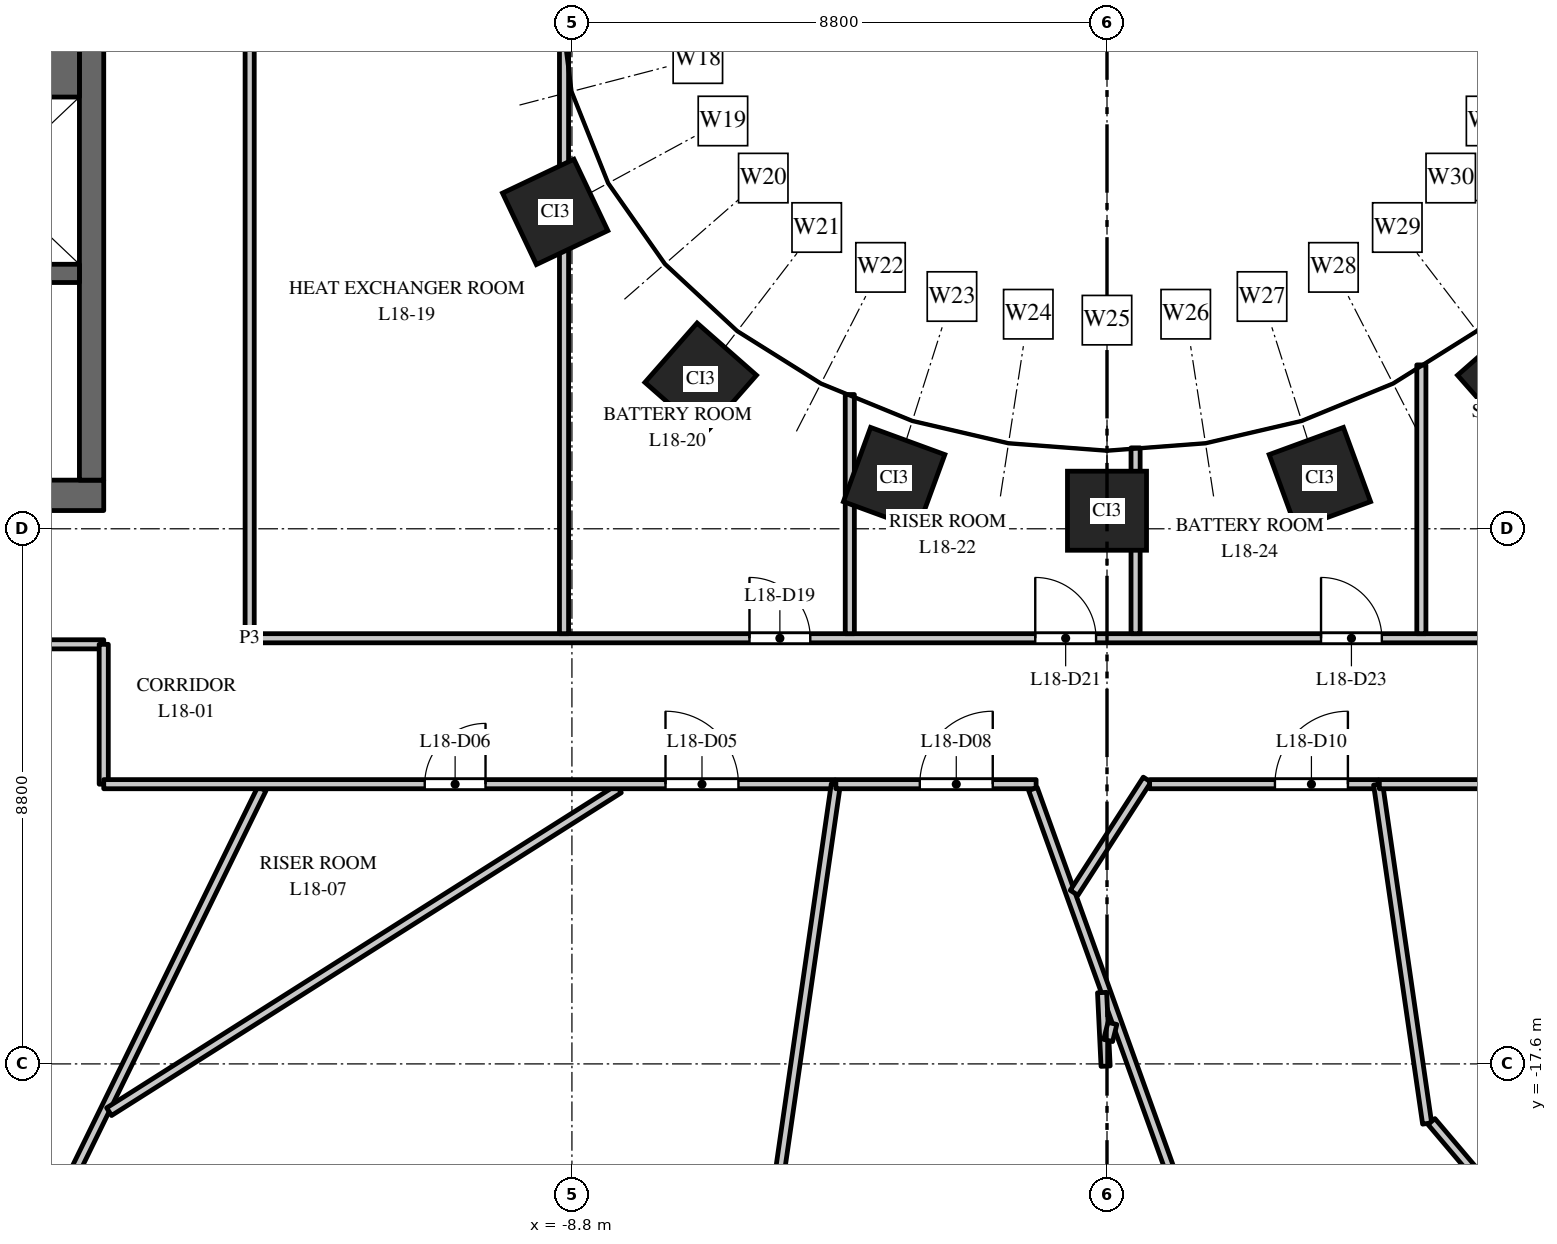
"""IFC4 building model, lengths in metres.
Left out: names, types, materials, properties, quantities, classifications, styles, units other than length and angle.
Written with IfcOpenShell. Run it as: python <this file> out.ifc"""

import sys

from ifc_helpers import new_model, si_unit, direction, frame, frame_2d, origin, origin_2d, place, context, subcontext, project, spatial, rectangle, extrude, element, fill, save


model = new_model("IFC4")
c1 = context("Model", 3, precision=1e-05, world=origin(), true_north=direction((0.0, 1.0)))
c2 = subcontext(c1, "Body", "Model", "MODEL_VIEW")
j1 = project(units=[si_unit("LENGTHUNIT", "METRE"), si_unit("PLANEANGLEUNIT", "RADIAN")], contexts=[c1])
p1 = place(None, origin())
s1 = spatial("IfcSite", under=j1, at=p1, CompositionType="ELEMENT")
p2 = place(p1, origin())
s2 = spatial("IfcBuilding", under=s1, at=p2, CompositionType="ELEMENT")
p3 = place(p2, frame((0.0, 0.0, 82.5)))
s3 = spatial("IfcBuildingStorey", under=s2, at=p3, CompositionType="ELEMENT", Elevation=82.5)
for number, where, z_axis, x_axis in (
    (1, (-9.076, -3.588, 0.0), (0.0, 0.0, 1.0), (0.429, -0.903, 0.0)),
    (2, (-6.682, -6.334, 0.0), (0.0, 0.0, 1.0), (0.751, -0.66, 0.0)),
    (3, (-3.501, -7.967, 0.0), (0.0, 0.0, 1.0), (0.939, -0.344, 0.0)),
    (4, (0.0, -8.503, 0.0), (0.0, 0.0, 1.0), (1.0, 0.0, 0.0)),
    (5, (3.501, -7.967, 0.0), (0.0, 0.0, 1.0), (0.939, 0.344, 0.0)),
    (6, (6.682, -6.334, 0.0), (0.0, 0.0, 1.0), (0.751, 0.66, 0.0)),
):
    element("IfcColumn", number, at=place(p3, frame(where, z_axis=z_axis, x_axis=x_axis)), inside=s3, PredefinedType="COLUMN", context=c2, shape_type="SweptSolid", body=[
        extrude(rectangle(XDim=1.3, YDim=1.3, at=origin_2d()), origin(), (0.0, 0.0, 1.0), 5.5),
    ])
p4 = place(p3, frame((-16.5, -8.25, 0.0), z_axis=(0.0, 0.0, 1.0), x_axis=(-1.0, 0.0, 0.0)))
e7 = element("IfcWall", 7, at=p4, inside=s3, PredefinedType="SHEAR", context=c2, shape_type="SweptSolid", body=[
    extrude(rectangle(XDim=15.0, YDim=0.5, at=frame_2d((7.5, 0.0))), origin(), (0.0, 0.0, 1.0), 5.2),
])
p5 = place(p4, frame((6.9, 0.0, 0.0)))
e8 = element("IfcOpeningElement", 8, at=p5, cuts=e7, PredefinedType="OPENING", context=c2, shape_type="SweptSolid", body=[
    extrude(rectangle(XDim=1.2, YDim=2.1, at=frame_2d((0.6, 1.05))), frame((0.0, 0.26, 0.0), z_axis=(0.0, -1.0, 0.0), x_axis=(1.0, 0.0, 0.0)), (0.0, 0.0, 1.0), 0.52),
])
p6 = place(p4, frame((12.57, 0.0, 0.0)))
e9 = element("IfcOpeningElement", 9, at=p6, cuts=e7, PredefinedType="OPENING", context=c2, shape_type="SweptSolid", body=[
    extrude(rectangle(XDim=0.9, YDim=2.1, at=frame_2d((0.45, 1.05))), frame((0.0, 0.26, 0.0), z_axis=(0.0, -1.0, 0.0), x_axis=(1.0, 0.0, 0.0)), (0.0, 0.0, 1.0), 0.52),
])
p7 = place(p3, frame((-16.7, -8.0, 0.0), z_axis=(0.0, 0.0, 1.0), x_axis=(0.0, 1.0, 0.0)))
e10 = element("IfcWall", 10, at=p7, inside=s3, PredefinedType="SHEAR", context=c2, shape_type="SweptSolid", body=[
    extrude(rectangle(XDim=16.0, YDim=0.4, at=frame_2d((8.0, 0.0))), origin(), (0.0, 0.0, 1.0), 5.2),
])
p8 = place(p3, frame((-16.9, -1.075, 0.0), z_axis=(0.0, 0.0, 1.0), x_axis=(-1.0, 0.0, 0.0)))
e11 = element("IfcWall", 11, at=p8, inside=s3, PredefinedType="SHEAR", context=c2, shape_type="SweptSolid", body=[
    extrude(rectangle(XDim=2.9, YDim=1.25, at=frame_2d((1.45, 0.0))), origin(), (0.0, 0.0, 1.0), 5.2),
])
p9 = place(p3, frame((-16.9, -4.6, 0.0), z_axis=(0.0, 0.0, 1.0), x_axis=(-1.0, 0.0, 0.0)))
e12 = element("IfcWall", 12, at=p9, inside=s3, PredefinedType="SHEAR", context=c2, shape_type="SweptSolid", body=[
    extrude(rectangle(XDim=6.18, YDim=0.3, at=frame_2d((3.09, 0.0))), origin(), (0.0, 0.0, 1.0), 5.2),
])
p10 = place(p9, frame((4.9, 0.0, 0.0)))
e13 = element("IfcOpeningElement", 13, at=p10, cuts=e12, PredefinedType="OPENING", context=c2, shape_type="SweptSolid", body=[
    extrude(rectangle(XDim=1.1, YDim=2.1, at=frame_2d((0.55, 1.05))), frame((0.0, 0.16, 0.0), z_axis=(0.0, -1.0, 0.0), x_axis=(1.0, 0.0, 0.0)), (0.0, 0.0, 1.0), 0.32),
])
p11 = place(p3, frame((-23.55, -10.7, 0.0), z_axis=(0.0, 0.0, 1.0), x_axis=(1.0, 0.0, 0.0)))
e14 = element("IfcWall", 14, at=p11, inside=s3, PredefinedType="PARTITIONING", context=c2, shape_type="SweptSolid", body=[
    extrude(rectangle(XDim=7.05, YDim=0.15, at=frame_2d((3.525, 0.0))), origin(), (0.0, 0.0, 1.0), 5.2),
])
p12 = place(p11, frame((2.05, 0.0, 0.0)))
e15 = element("IfcOpeningElement", 15, at=p12, cuts=e14, PredefinedType="OPENING", context=c2, shape_type="SweptSolid", body=[
    extrude(rectangle(XDim=1.2, YDim=2.1, at=frame_2d((0.6, 1.05))), frame((0.0, 0.085, 0.0), z_axis=(0.0, -1.0, 0.0), x_axis=(1.0, 0.0, 0.0)), (0.0, 0.0, 1.0), 0.17),
])
p13 = place(p3, frame((-18.69, -22.875, 0.0), z_axis=(0.0, 0.0, 1.0), x_axis=(0.439201300969, 0.898388678261, 0.0)))
e16 = element("IfcWall", 16, at=p13, inside=s3, PredefinedType="PARTITIONING", context=c2, shape_type="SweptSolid", body=[
    extrude(rectangle(XDim=10.908, YDim=0.15, at=frame_2d((5.454, 0.0))), origin(), (0.0, 0.0, 1.0), 5.2),
])
p14 = place(p3, frame((-16.412, -18.386, 0.0), z_axis=(0.0, 0.0, 1.0), x_axis=(0.844855771647, 0.534994135588, 0.0)))
e17 = element("IfcWall", 17, at=p14, inside=s3, PredefinedType="PARTITIONING", context=c2, shape_type="SweptSolid", body=[
    extrude(rectangle(XDim=9.924, YDim=0.15, at=frame_2d((4.962, 0.0))), origin(), (0.0, 0.0, 1.0), 4.35),
])
p15 = place(p3, frame((-16.5, -13.0, 0.0), z_axis=(0.0, 0.0, 1.0), x_axis=(0.0, 1.0, 0.0)))
e18 = element("IfcWall", 18, at=p15, inside=s3, PredefinedType="PARTITIONING", context=c2, shape_type="SweptSolid", body=[
    extrude(rectangle(XDim=2.3, YDim=0.15, at=frame_2d((1.15, 0.0))), origin(), (0.0, 0.0, 1.0), 4.25),
])
p16 = place(p3, frame((-16.5, -13.0, 0.0), z_axis=(0.0, 0.0, 1.0), x_axis=(1.0, 0.0, 0.0)))
e19 = element("IfcWall", 19, at=p16, inside=s3, PredefinedType="PARTITIONING", context=c2, shape_type="SweptSolid", body=[
    extrude(rectangle(XDim=12.021, YDim=0.15, at=frame_2d((6.01, 0.0))), origin(), (0.0, 0.0, 1.0), 4.35),
])
p17 = place(p16, frame((9.239, 0.0, 0.0)))
e20 = element("IfcOpeningElement", 20, at=p17, cuts=e19, PredefinedType="OPENING", context=c2, shape_type="SweptSolid", body=[
    extrude(rectangle(XDim=1.2, YDim=2.1, at=frame_2d((0.6, 1.05))), frame((0.0, 0.085, 0.0), z_axis=(0.0, -1.0, 0.0), x_axis=(1.0, 0.0, 0.0)), (0.0, 0.0, 1.0), 0.17),
])
p18 = place(p16, frame((5.279, 0.0, 0.0)))
e21 = element("IfcOpeningElement", 21, at=p18, cuts=e19, PredefinedType="OPENING", context=c2, shape_type="SweptSolid", body=[
    extrude(rectangle(XDim=1.0, YDim=2.1, at=frame_2d((0.5, 1.05))), frame((0.0, 0.085, 0.0), z_axis=(0.0, -1.0, 0.0), x_axis=(1.0, 0.0, 0.0)), (0.0, 0.0, 1.0), 0.17),
])
p19 = place(p3, frame((-14.1, -10.6, 0.0), z_axis=(0.0, 0.0, 1.0), x_axis=(0.0, 1.0, 0.0)))
e22 = element("IfcWall", 22, at=p19, inside=s3, PredefinedType="PARTITIONING", context=c2, shape_type="SweptSolid", body=[
    extrude(rectangle(XDim=21.2, YDim=0.15, at=frame_2d((10.6, 0.0))), origin(), (0.0, 0.0, 1.0), 4.25),
])
p20 = place(p19, frame((19.4, 0.0, 0.0)))
e23 = element("IfcOpeningElement", 23, at=p20, cuts=e22, PredefinedType="OPENING", context=c2, shape_type="SweptSolid", body=[
    extrude(rectangle(XDim=1.2, YDim=2.1, at=frame_2d((0.6, 1.05))), frame((0.0, 0.085, 0.0), z_axis=(0.0, -1.0, 0.0), x_axis=(1.0, 0.0, 0.0)), (0.0, 0.0, 1.0), 0.17),
])
p21 = place(p3, frame((-14.1, -10.6, 0.0), z_axis=(0.0, 0.0, 1.0), x_axis=(1.0, 0.0, 0.0)))
e24 = element("IfcWall", 24, at=p21, inside=s3, PredefinedType="PARTITIONING", context=c2, shape_type="SweptSolid", body=[
    extrude(rectangle(XDim=28.2, YDim=0.15, at=frame_2d((14.1, 0.0))), origin(), (0.0, 0.0, 1.0), 4.35),
])
p22 = place(p21, frame((8.22, 0.0, 0.0)))
e25 = element("IfcOpeningElement", 25, at=p22, cuts=e24, PredefinedType="OPENING", context=c2, shape_type="SweptSolid", body=[
    extrude(rectangle(XDim=1.0, YDim=2.1, at=frame_2d((0.5, 1.05))), frame((0.0, 0.085, 0.0), z_axis=(0.0, -1.0, 0.0), x_axis=(1.0, 0.0, 0.0)), (0.0, 0.0, 1.0), 0.17),
])
p23 = place(p21, frame((12.92, 0.0, 0.0)))
e26 = element("IfcOpeningElement", 26, at=p23, cuts=e24, PredefinedType="OPENING", context=c2, shape_type="SweptSolid", body=[
    extrude(rectangle(XDim=1.0, YDim=2.1, at=frame_2d((0.5, 1.05))), frame((0.0, 0.085, 0.0), z_axis=(0.0, -1.0, 0.0), x_axis=(1.0, 0.0, 0.0)), (0.0, 0.0, 1.0), 0.17),
])
p24 = place(p21, frame((17.62, 0.0, 0.0)))
e27 = element("IfcOpeningElement", 27, at=p24, cuts=e24, PredefinedType="OPENING", context=c2, shape_type="SweptSolid", body=[
    extrude(rectangle(XDim=1.0, YDim=2.1, at=frame_2d((0.5, 1.05))), frame((0.0, 0.085, 0.0), z_axis=(0.0, -1.0, 0.0), x_axis=(1.0, 0.0, 0.0)), (0.0, 0.0, 1.0), 0.17),
])
p25 = place(p3, frame((-8.93, -10.525, 0.0), z_axis=(0.0, 0.0, 1.0), x_axis=(0.0, 1.0, 0.0)))
e28 = element("IfcWall", 28, at=p25, inside=s3, PredefinedType="PARTITIONING", context=c2, shape_type="SweptSolid", body=[
    extrude(rectangle(XDim=10.007, YDim=0.15, at=frame_2d((5.003, 0.0))), origin(), (0.0, 0.0, 1.0), 4.25),
])
p26 = place(p3, frame((-5.896, -22.946, 0.0), z_axis=(0.0, 0.0, 1.0), x_axis=(0.142955736686, 0.989729082804, 0.0)))
e29 = element("IfcWall", 29, at=p26, inside=s3, PredefinedType="PARTITIONING", context=c2, shape_type="SweptSolid", body=[
    extrude(rectangle(XDim=10.045, YDim=0.15, at=frame_2d((5.023, 0.0))), origin(), (0.0, 0.0, 1.0), 5.2),
])
p27 = place(p3, frame((-4.459, -13.0, 0.0), z_axis=(0.0, 0.0, 1.0), x_axis=(1.0, 0.0, 0.0)))
e30 = element("IfcWall", 30, at=p27, inside=s3, PredefinedType="PARTITIONING", context=c2, shape_type="SweptSolid", body=[
    extrude(rectangle(XDim=3.293, YDim=0.15, at=frame_2d((1.646, 0.0))), origin(), (0.0, 0.0, 1.0), 5.2),
])
p28 = place(p27, frame((1.38, 0.0, 0.0)))
e31 = element("IfcOpeningElement", 31, at=p28, cuts=e30, PredefinedType="OPENING", context=c2, shape_type="SweptSolid", body=[
    extrude(rectangle(XDim=1.2, YDim=2.1, at=frame_2d((0.6, 1.05))), frame((0.0, 0.085, 0.0), z_axis=(0.0, -1.0, 0.0), x_axis=(1.0, 0.0, 0.0)), (0.0, 0.0, 1.0), 0.17),
])
p29 = place(p3, frame((-4.23, -10.525, 0.0), z_axis=(0.0, 0.0, 1.0), x_axis=(0.0, 1.0, 0.0)))
e32 = element("IfcWall", 32, at=p29, inside=s3, PredefinedType="PARTITIONING", context=c2, shape_type="SweptSolid", body=[
    extrude(rectangle(XDim=3.933, YDim=0.15, at=frame_2d((1.966, 0.0))), origin(), (0.0, 0.0, 1.0), 4.35),
])
p30 = place(p3, frame((-1.218, -13.079, 0.0), z_axis=(0.0, 0.0, 1.0), x_axis=(0.338466321872, -0.940978506109, 0.0)))
e33 = element("IfcWall", 33, at=p30, inside=s3, PredefinedType="PARTITIONING", context=c2, shape_type="SweptSolid", body=[
    extrude(rectangle(XDim=14.139, YDim=0.15, at=frame_2d((7.07, 0.0))), origin(), (0.0, 0.0, 1.0), 4.35),
])
p31 = place(p3, frame((-0.081, -16.427, 0.0), z_axis=(0.0, 0.0, 1.0), x_axis=(0.047967320325, -0.998848905581, 0.0)))
e34 = element("IfcWall", 34, at=p31, inside=s3, PredefinedType="PARTITIONING", context=c2, shape_type="SweptSolid", body=[
    extrude(rectangle(XDim=1.211, YDim=0.15, at=frame_2d((0.606, 0.0))), origin(), (0.0, 0.0, 1.0), 5.2),
])
p32 = place(p3, frame((-0.541, -14.786, 0.0), z_axis=(0.0, 0.0, 1.0), x_axis=(0.542249897207, 0.840217262962, 0.0)))
e35 = element("IfcWall", 35, at=p32, inside=s3, PredefinedType="PARTITIONING", context=c2, shape_type="SweptSolid", body=[
    extrude(rectangle(XDim=2.215, YDim=0.15, at=frame_2d((1.107, 0.0))), origin(), (0.0, 0.0, 1.0), 5.2),
])
p33 = place(p3, frame((0.019, -17.215, 0.0), z_axis=(0.0, 0.0, 1.0), x_axis=(0.241940521765, 0.970291082061, 0.0)))
e36 = element("IfcWall", 36, at=p33, inside=s3, PredefinedType="PARTITIONING", context=c2, shape_type="SweptSolid", body=[
    extrude(rectangle(XDim=0.29, YDim=0.15, at=frame_2d((0.145, 0.0))), origin(), (0.0, 0.0, 1.0), 5.2),
])
p34 = place(p3, frame((0.47, -10.525, 0.0), z_axis=(0.0, 0.0, 1.0), x_axis=(0.0, 1.0, 0.0)))
e37 = element("IfcWall", 37, at=p34, inside=s3, PredefinedType="PARTITIONING", context=c2, shape_type="SweptSolid", body=[
    extrude(rectangle(XDim=3.056, YDim=0.15, at=frame_2d((1.528, 0.0))), origin(), (0.0, 0.0, 1.0), 4.4),
])
p35 = place(p3, frame((0.701, -13.0, 0.0), z_axis=(0.0, 0.0, 1.0), x_axis=(1.0, 0.0, 0.0)))
e38 = element("IfcWall", 38, at=p35, inside=s3, PredefinedType="PARTITIONING", context=c2, shape_type="SweptSolid", body=[
    extrude(rectangle(XDim=3.758, YDim=0.15, at=frame_2d((1.879, 0.0))), origin(), (0.0, 0.0, 1.0), 4.35),
])
p36 = place(p35, frame((2.061, 0.0, 0.0)))
e39 = element("IfcOpeningElement", 39, at=p36, cuts=e38, PredefinedType="OPENING", context=c2, shape_type="SweptSolid", body=[
    extrude(rectangle(XDim=1.2, YDim=2.1, at=frame_2d((0.6, 1.05))), frame((0.0, 0.085, 0.0), z_axis=(0.0, -1.0, 0.0), x_axis=(1.0, 0.0, 0.0)), (0.0, 0.0, 1.0), 0.17),
])
p37 = place(p3, frame((4.459, -13.004, 0.0), z_axis=(0.0, 0.0, 1.0), x_axis=(0.143040939826, -0.989716772382, 0.0)))
e40 = element("IfcWall", 40, at=p37, inside=s3, PredefinedType="PARTITIONING", context=c2, shape_type="SweptSolid", body=[
    extrude(rectangle(XDim=5.634, YDim=0.15, at=frame_2d((2.817, 0.0))), origin(), (0.0, 0.0, 1.0), 5.2),
])
p38 = place(p3, frame((4.479, -13.0, 0.0), z_axis=(0.0, 0.0, 1.0), x_axis=(1.0, 0.0, 0.0)))
e41 = element("IfcWall", 41, at=p38, inside=s3, PredefinedType="PARTITIONING", context=c2, shape_type="SweptSolid", body=[
    extrude(rectangle(XDim=12.021, YDim=0.15, at=frame_2d((6.01, 0.0))), origin(), (0.0, 0.0, 1.0), 4.35),
])
p39 = place(p38, frame((7.63, 0.0, 0.0)))
e42 = element("IfcOpeningElement", 42, at=p39, cuts=e41, PredefinedType="OPENING", context=c2, shape_type="SweptSolid", body=[
    extrude(rectangle(XDim=1.2, YDim=2.1, at=frame_2d((0.6, 1.05))), frame((0.0, 0.085, 0.0), z_axis=(0.0, -1.0, 0.0), x_axis=(1.0, 0.0, 0.0)), (0.0, 0.0, 1.0), 0.17),
])
p40 = place(p3, frame((5.17, -10.525, 0.0), z_axis=(0.0, 0.0, 1.0), x_axis=(0.0, 1.0, 0.0)))
e43 = element("IfcWall", 43, at=p40, inside=s3, PredefinedType="PARTITIONING", context=c2, shape_type="SweptSolid", body=[
    extrude(rectangle(XDim=4.42, YDim=0.15, at=frame_2d((2.21, 0.0))), origin(), (0.0, 0.0, 1.0), 4.35),
])
p41 = place(p3, frame((5.336, -18.548, 0.0), z_axis=(0.0, 0.0, 1.0), x_axis=(0.64652969132, -0.7628888243, 0.0)))
e44 = element("IfcWall", 44, at=p41, inside=s3, PredefinedType="PARTITIONING", context=c2, shape_type="SweptSolid", body=[
    extrude(rectangle(XDim=8.735, YDim=0.15, at=frame_2d((4.367, 0.0))), origin(), (0.0, 0.0, 1.0), 4.4),
])
p42 = place(p17, origin())
e45 = element("IfcDoor", 45, at=p42, inside=s3, OperationType="SINGLE_SWING_LEFT", PredefinedType="DOOR", context=c2, shape_type="SweptSolid", body=[
    extrude(rectangle(XDim=1.2, YDim=2.1, at=frame_2d((0.6, 1.05))), frame((0.0, 0.025, 0.0), z_axis=(0.0, -1.0, 0.0), x_axis=(1.0, 0.0, 0.0)), (0.0, 0.0, 1.0), 0.05),
])
fill(e20, e45)
p43 = place(p18, origin())
e46 = element("IfcDoor", 46, at=p43, inside=s3, OperationType="SINGLE_SWING_RIGHT", PredefinedType="DOOR", context=c2, shape_type="SweptSolid", body=[
    extrude(rectangle(XDim=1.0, YDim=2.1, at=frame_2d((0.5, 1.05))), frame((0.0, 0.025, 0.0), z_axis=(0.0, -1.0, 0.0), x_axis=(1.0, 0.0, 0.0)), (0.0, 0.0, 1.0), 0.05),
])
fill(e21, e46)
p44 = place(p28, origin())
e47 = element("IfcDoor", 47, at=p44, inside=s3, OperationType="SINGLE_SWING_RIGHT", PredefinedType="DOOR", context=c2, shape_type="SweptSolid", body=[
    extrude(rectangle(XDim=1.2, YDim=2.1, at=frame_2d((0.6, 1.05))), frame((0.0, 0.025, 0.0), z_axis=(0.0, -1.0, 0.0), x_axis=(1.0, 0.0, 0.0)), (0.0, 0.0, 1.0), 0.05),
])
fill(e31, e47)
p45 = place(p36, origin())
e48 = element("IfcDoor", 48, at=p45, inside=s3, OperationType="SINGLE_SWING_RIGHT", PredefinedType="DOOR", context=c2, shape_type="SweptSolid", body=[
    extrude(rectangle(XDim=1.2, YDim=2.1, at=frame_2d((0.6, 1.05))), frame((0.0, 0.025, 0.0), z_axis=(0.0, -1.0, 0.0), x_axis=(1.0, 0.0, 0.0)), (0.0, 0.0, 1.0), 0.05),
])
fill(e39, e48)
p46 = place(p22, origin())
e49 = element("IfcDoor", 49, at=p46, inside=s3, OperationType="SINGLE_SWING_LEFT", PredefinedType="DOOR", context=c2, shape_type="SweptSolid", body=[
    extrude(rectangle(XDim=1.0, YDim=2.1, at=frame_2d((0.5, 1.05))), frame((0.0, 0.025, 0.0), z_axis=(0.0, -1.0, 0.0), x_axis=(1.0, 0.0, 0.0)), (0.0, 0.0, 1.0), 0.05),
])
fill(e25, e49)
p47 = place(p23, origin())
e50 = element("IfcDoor", 50, at=p47, inside=s3, OperationType="SINGLE_SWING_LEFT", PredefinedType="DOOR", context=c2, shape_type="SweptSolid", body=[
    extrude(rectangle(XDim=1.0, YDim=2.1, at=frame_2d((0.5, 1.05))), frame((0.0, 0.025, 0.0), z_axis=(0.0, -1.0, 0.0), x_axis=(1.0, 0.0, 0.0)), (0.0, 0.0, 1.0), 0.05),
])
fill(e26, e50)
p48 = place(p24, origin())
e51 = element("IfcDoor", 51, at=p48, inside=s3, OperationType="SINGLE_SWING_LEFT", PredefinedType="DOOR", context=c2, shape_type="SweptSolid", body=[
    extrude(rectangle(XDim=1.0, YDim=2.1, at=frame_2d((0.5, 1.05))), frame((0.0, 0.025, 0.0), z_axis=(0.0, -1.0, 0.0), x_axis=(1.0, 0.0, 0.0)), (0.0, 0.0, 1.0), 0.05),
])
fill(e27, e51)
save(model, sys.argv[1])
